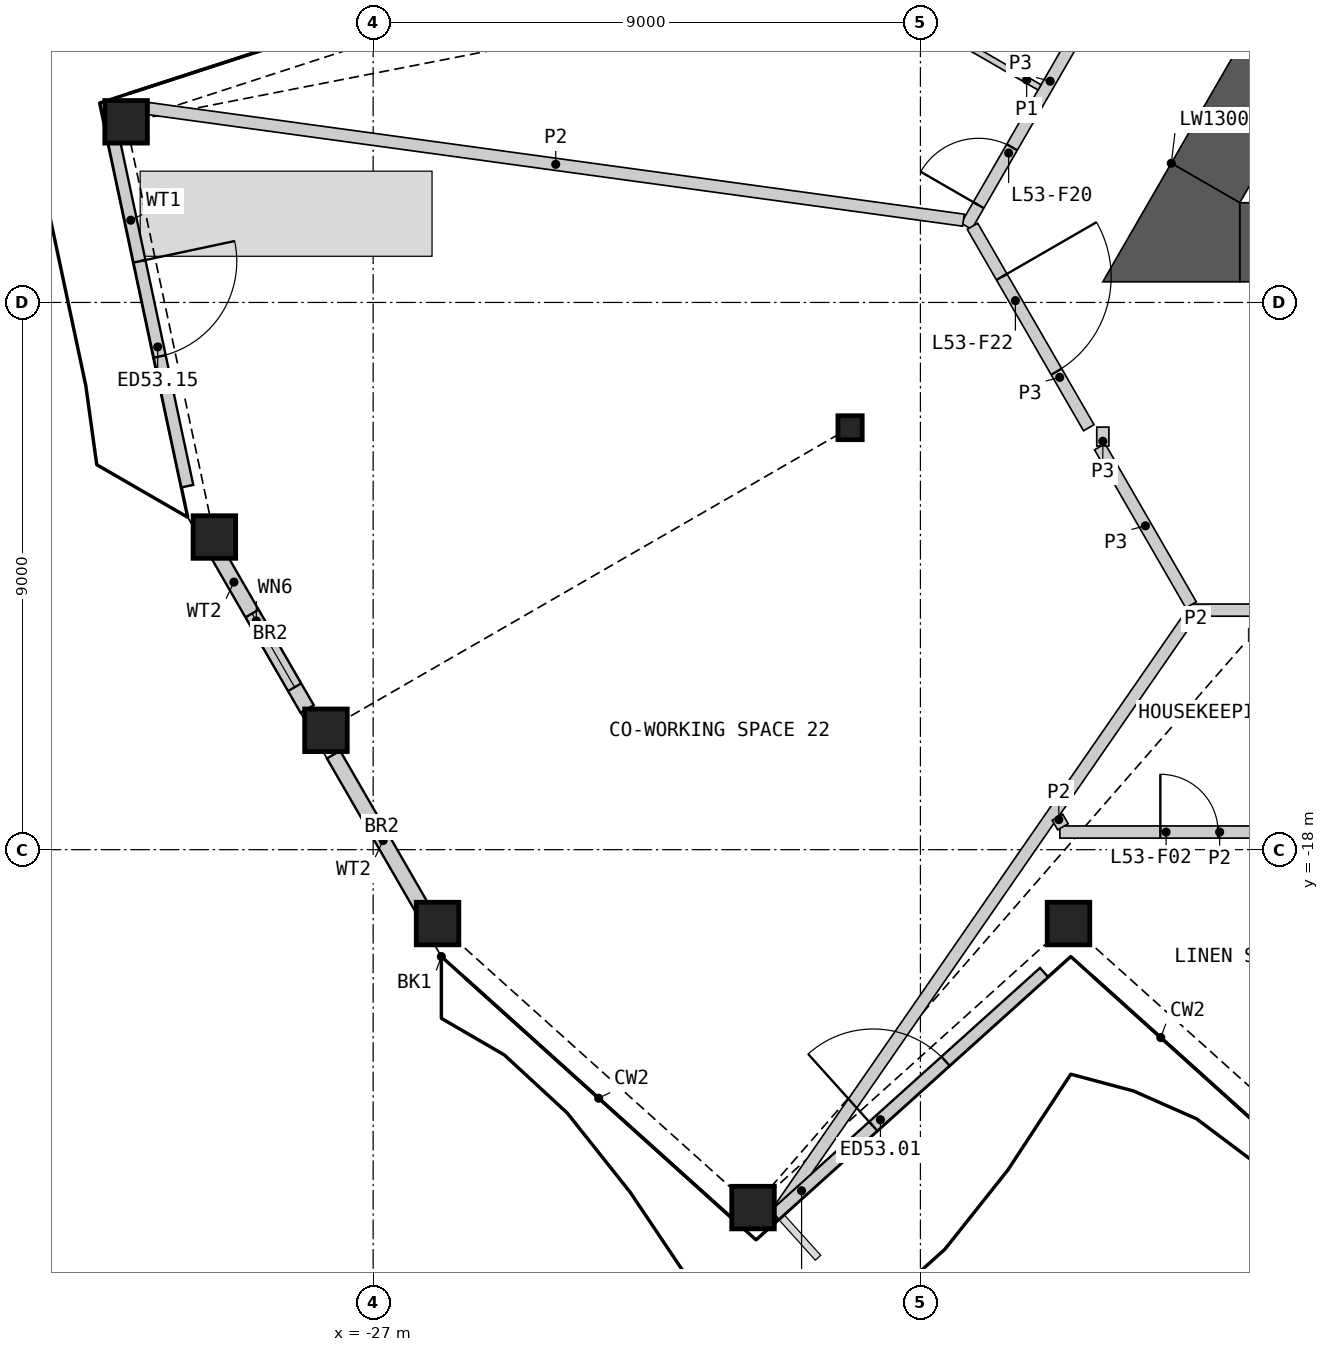
"""IFC4 building model, lengths in metres.
Left out: names, types, materials, properties, quantities, classifications, styles, units other than length and angle.
Written with IfcOpenShell. Run it as: python <this file> out.ifc"""

import sys

from ifc_helpers import new_model, si_unit, direction, frame, frame_2d, origin, origin_2d, place, context, subcontext, project, spatial, polyline, rectangle, hollow_rectangle, i_section, outline, extrude, element, fill, save


model = new_model("IFC4")
c1 = context("Model", 3, precision=1e-05, world=origin(), true_north=direction((0.0, 1.0)))
c2 = subcontext(c1, "Body", "Model", "MODEL_VIEW")
j1 = project(units=[si_unit("LENGTHUNIT", "METRE"), si_unit("PLANEANGLEUNIT", "RADIAN")], contexts=[c1])
p1 = place(None, origin())
s1 = spatial("IfcSite", under=j1, at=p1, CompositionType="ELEMENT")
p2 = place(p1, origin())
s2 = spatial("IfcBuilding", under=s1, at=p2, CompositionType="ELEMENT")
p3 = place(p2, frame((0.0, 0.0, 241.8)))
s3 = spatial("IfcBuildingStorey", under=s2, at=p3, CompositionType="ELEMENT", Elevation=241.8)
for number, where, z_axis, x_axis in (
    (1, (-25.941, -19.215, 0.0), (0.0, 0.0, 1.0), (1.0, 0.0, 0.0)),
    (2, (-20.753, -23.887, 0.0), (0.0, 0.0, 1.0), (1.0, 0.0, 0.0)),
    (3, (-15.565, -19.215, 0.0), (0.0, 0.0, 1.0), (1.0, 0.0, 0.0)),
    (4, (-31.063, -6.029, 0.0), (0.0, 0.0, 1.0), (1.0, 0.0, 0.0)),
    (5, (-29.612, -12.858, 0.0), (0.0, 0.0, 1.0), (1.0, 0.0, 0.0)),
    (6, (-27.776, -16.037, 0.0), (0.0, 0.0, 1.0), (1.0, 0.0, 0.0)),
):
    element("IfcColumn", number, at=place(p3, frame(where, z_axis=z_axis, x_axis=x_axis)), inside=s3, PredefinedType="COLUMN", context=c2, shape_type="SweptSolid", body=[
        extrude(hollow_rectangle(XDim=0.7, YDim=0.7, WallThickness=0.045, at=origin_2d()), origin(), (0.0, 0.0, 1.0), 3.6),
    ])
p4 = place(p3, frame((-19.157, -11.06, 0.0), z_axis=(0.0, 0.0, 1.0), x_axis=(1.0, 0.0, 0.0)))
e7 = element("IfcColumn", 7, at=p4, inside=s3, PredefinedType="COLUMN", context=c2, shape_type="SweptSolid", body=[
    extrude(i_section(OverallWidth=0.399, OverallDepth=0.393, WebThickness=0.023, FlangeThickness=0.037, at=origin_2d()), origin(), (0.0, 0.0, 1.0), 3.6),
])
p5 = place(p3, frame((-20.397, -24.009, 0.0), z_axis=(0.0, 0.0, 1.0), x_axis=(0.74315161366, 0.669123067241, 0.0)))
e8 = element("IfcWall", 8, at=p5, inside=s3, PredefinedType="SOLIDWALL", context=c2, shape_type="SweptSolid", body=[
    extrude(rectangle(XDim=5.963, YDim=0.2, at=frame_2d((2.981, 0.0))), origin(), (0.0, 0.0, 1.0), 2.701),
])
p6 = place(p5, frame((2.181, 0.0, 0.0)))
e9 = element("IfcOpeningElement", 9, at=p6, cuts=e8, PredefinedType="OPENING", context=c2, shape_type="SweptSolid", body=[
    extrude(rectangle(XDim=1.6, YDim=2.4, at=frame_2d((0.8, 1.2))), frame((0.0, 0.11, 0.0), z_axis=(0.0, -1.0, 0.0), x_axis=(1.0, 0.0, 0.0)), (0.0, 0.0, 1.0), 0.22),
])
p7 = place(p3, frame((-31.296, -6.189, 0.0), z_axis=(0.0, 0.0, 1.0), x_axis=(0.207920947907, -0.978145633033, 0.0)))
e10 = element("IfcWall", 10, at=p7, inside=s3, PredefinedType="SOLIDWALL", context=c2, shape_type="SweptSolid", body=[
    extrude(rectangle(XDim=5.963, YDim=0.2, at=frame_2d((2.981, 0.0))), origin(), (0.0, 0.0, 1.0), 2.701),
])
p8 = place(p7, frame((2.181, 0.0, 0.0)))
e11 = element("IfcOpeningElement", 11, at=p8, cuts=e10, PredefinedType="OPENING", context=c2, shape_type="SweptSolid", body=[
    extrude(rectangle(XDim=1.6, YDim=2.4, at=frame_2d((0.8, 1.2))), frame((0.0, 0.11, 0.0), z_axis=(0.0, -1.0, 0.0), x_axis=(1.0, 0.0, 0.0)), (0.0, 0.0, 1.0), 0.22),
])
p9 = place(p3, frame((-29.692, -12.904, 0.0), z_axis=(0.0, 0.0, 1.0), x_axis=(0.499987708133, -0.866032500381, 0.0)))
e12 = element("IfcWall", 12, at=p9, inside=s3, PredefinedType="SOLIDWALL", context=c2, shape_type="SweptSolid", body=[
    extrude(rectangle(XDim=3.213, YDim=0.25, at=frame_2d((1.607, 0.0))), origin(), (0.0, 0.0, 1.0), 2.701),
])
p10 = place(p9, frame((1.4, 0.0, 1.9)))
e13 = element("IfcOpeningElement", 13, at=p10, cuts=e12, PredefinedType="OPENING", context=c2, shape_type="SweptSolid", body=[
    extrude(rectangle(XDim=1.4, YDim=0.6, at=frame_2d((0.7, 0.3))), frame((0.0, 0.135, 0.0), z_axis=(0.0, -1.0, 0.0), x_axis=(1.0, 0.0, 0.0)), (0.0, 0.0, 1.0), 0.27),
])
p11 = place(p3, frame((-27.652, -16.437, 0.0), z_axis=(0.0, 0.0, 1.0), x_axis=(0.500026945261, -0.866009846372, 0.0)))
e14 = element("IfcWall", 14, at=p11, inside=s3, PredefinedType="SOLIDWALL", context=c2, shape_type="SweptSolid", body=[
    extrude(rectangle(XDim=3.262, YDim=0.25, at=frame_2d((1.631, 0.0))), origin(), (0.0, 0.0, 1.0), 2.701),
])
p12 = place(p3, frame((-12.748, -8.01, 0.0), z_axis=(0.0, 0.0, 1.0), x_axis=(1.0, 0.0, 0.0)))
e15 = element("IfcWall", 15, at=p12, inside=s3, PredefinedType="SHEAR", context=c2, shape_type="SweptSolid", body=[
    extrude(rectangle(XDim=4.26, YDim=1.3, at=frame_2d((2.13, 0.0))), origin(), (0.0, 0.0, 1.0), 3.25),
])
p13 = place(p3, frame((-10.338, -1.885, 0.0), z_axis=(0.0, 0.0, 1.0), x_axis=(-0.499975944838, -0.866039291593, 0.0)))
e16 = element("IfcWall", 16, at=p13, inside=s3, PredefinedType="SHEAR", context=c2, shape_type="SweptSolid", body=[
    extrude(rectangle(XDim=5.947, YDim=1.3, at=frame_2d((2.974, 0.0))), origin(), (0.0, 0.0, 1.0), 3.25),
])
p14 = place(p3, origin())
e17 = element("IfcWall", 17, at=p14, inside=s3, PredefinedType="SHEAR", context=c2, shape_type="SweptSolid", body=[
    extrude(outline(polyline([(-13.874, -6.71), (-12.748, -7.36), (-12.748, -8.66), (-15.0, -8.66), (-13.874, -6.71)])), origin(), (0.0, 0.0, 1.0), 3.25),
])
p15 = place(p3, frame((-13.599, -14.06, 0.0), z_axis=(0.0, 0.0, 1.0), x_axis=(1.0, 0.0, 0.0)))
e18 = element("IfcWall", 18, at=p15, inside=s3, PredefinedType="PARTITIONING", context=c2, shape_type="SweptSolid", body=[
    extrude(rectangle(XDim=27.198, YDim=0.2, at=frame_2d((13.599, 0.0))), origin(), (0.0, 0.0, 1.0), 3.25),
])
p16 = place(p15, frame((1.152, 0.0, 0.0)))
e19 = element("IfcOpeningElement", 19, at=p16, cuts=e18, PredefinedType="OPENING", context=c2, shape_type="SweptSolid", body=[
    extrude(rectangle(XDim=0.95, YDim=2.1, at=frame_2d((0.475, 1.05))), frame((0.0, 0.11, 0.0), z_axis=(0.0, -1.0, 0.0), x_axis=(1.0, 0.0, 0.0)), (0.0, 0.0, 1.0), 0.22),
])
p17 = place(p15, frame((16.311, 0.0, 0.0)))
e20 = element("IfcOpeningElement", 20, at=p17, cuts=e18, PredefinedType="OPENING", context=c2, shape_type="SweptSolid", body=[
    extrude(rectangle(XDim=1.1, YDim=2.1, at=frame_2d((0.55, 1.05))), frame((0.0, 0.11, 0.0), z_axis=(0.0, -1.0, 0.0), x_axis=(1.0, 0.0, 0.0)), (0.0, 0.0, 1.0), 0.22),
])
p18 = place(p15, frame((25.747, 0.0, 0.0)))
e21 = element("IfcOpeningElement", 21, at=p18, cuts=e18, PredefinedType="OPENING", context=c2, shape_type="SweptSolid", body=[
    extrude(rectangle(XDim=1.1, YDim=2.1, at=frame_2d((0.55, 1.05))), frame((0.0, 0.11, 0.0), z_axis=(0.0, -1.0, 0.0), x_axis=(1.0, 0.0, 0.0)), (0.0, 0.0, 1.0), 0.22),
])
p19 = place(p3, frame((-17.244, -7.747, 0.0), z_axis=(0.0, 0.0, 1.0), x_axis=(0.500017753321, 0.866015153657, 0.0)))
e22 = element("IfcWall", 22, at=p19, inside=s3, PredefinedType="PARTITIONING", context=c2, shape_type="SweptSolid", body=[
    extrude(rectangle(XDim=5.51, YDim=0.2, at=frame_2d((2.755, 0.0))), origin(), (0.0, 0.0, 1.0), 3.25),
])
p20 = place(p19, frame((0.401, 0.0, 0.0)))
e23 = element("IfcOpeningElement", 23, at=p20, cuts=e22, PredefinedType="OPENING", context=c2, shape_type="SweptSolid", body=[
    extrude(rectangle(XDim=1.1, YDim=2.1, at=frame_2d((0.55, 1.05))), frame((0.0, 0.11, 0.0), z_axis=(0.0, -1.0, 0.0), x_axis=(1.0, 0.0, 0.0)), (0.0, 0.0, 1.0), 0.22),
])
p21 = place(p3, frame((-17.144, -7.747, 0.0), z_axis=(0.0, 0.0, 1.0), x_axis=(0.499961815444, -0.866047448526, 0.0)))
e24 = element("IfcWall", 24, at=p21, inside=s3, PredefinedType="PARTITIONING", context=c2, shape_type="SweptSolid", body=[
    extrude(rectangle(XDim=3.826, YDim=0.2, at=frame_2d((1.913, 0.0))), origin(), (0.0, 0.0, 1.0), 3.25),
])
p22 = place(p21, frame((0.962, 0.0, 0.0)))
e25 = element("IfcOpeningElement", 25, at=p22, cuts=e24, PredefinedType="OPENING", context=c2, shape_type="SweptSolid", body=[
    extrude(rectangle(XDim=1.8, YDim=2.1, at=frame_2d((0.9, 1.05))), frame((0.0, 0.11, 0.0), z_axis=(0.0, -1.0, 0.0), x_axis=(1.0, 0.0, 0.0)), (0.0, 0.0, 1.0), 0.22),
])
p23 = place(p3, frame((-15.05, -11.374, 0.0), z_axis=(0.0, 0.0, 1.0), x_axis=(0.500048608389, -0.865997337899, 0.0)))
e26 = element("IfcWall", 26, at=p23, inside=s3, PredefinedType="PARTITIONING", context=c2, shape_type="SweptSolid", body=[
    extrude(rectangle(XDim=3.002, YDim=0.2, at=frame_2d((1.501, 0.0))), origin(), (0.0, 0.0, 1.0), 3.25),
])
p24 = place(p3, frame((-15.0, -11.36, 0.0), z_axis=(0.0, 0.0, 1.0), x_axis=(0.0, 1.0, 0.0)))
e27 = element("IfcWall", 27, at=p24, inside=s3, PredefinedType="PARTITIONING", context=c2, shape_type="SweptSolid", body=[
    extrude(rectangle(XDim=0.31, YDim=0.2, at=frame_2d((0.155, 0.0))), origin(), (0.0, 0.0, 1.0), 3.25),
])
p25 = place(p3, frame((-30.703, -5.81, 0.0), z_axis=(0.0, 0.0, 1.0), x_axis=(0.99075075074, -0.135694325259, 0.0)))
e28 = element("IfcWall", 28, at=p25, inside=s3, PredefinedType="PARTITIONING", context=c2, shape_type="SweptSolid", body=[
    extrude(rectangle(XDim=13.535, YDim=0.2, at=frame_2d((6.768, 0.0))), origin(), (0.0, 0.0, 1.0), 2.404),
])
p26 = place(p3, origin())
e29 = element("IfcWall", 29, at=p26, inside=s3, PredefinedType="PARTITIONING", context=c2, shape_type="SweptSolid", body=[
    extrude(outline(polyline([(-13.473, -14.199), (-19.794, -23.331), (-20.439, -23.912), (-13.638, -14.086), (-13.473, -14.199)])), origin(), (0.0, 0.0, 1.0), 2.404),
])
p27 = place(p3, frame((-15.706, -17.71, 0.0), z_axis=(0.0, 0.0, 1.0), x_axis=(1.0, 0.0, 0.0)))
e30 = element("IfcWall", 30, at=p27, inside=s3, PredefinedType="PARTITIONING", context=c2, shape_type="SweptSolid", body=[
    extrude(rectangle(XDim=5.255, YDim=0.2, at=frame_2d((2.627, 0.0))), origin(), (0.0, 0.0, 1.0), 2.404),
])
p28 = place(p27, frame((1.652, 0.0, 0.0)))
e31 = element("IfcOpeningElement", 31, at=p28, cuts=e30, PredefinedType="OPENING", context=c2, shape_type="SweptSolid", body=[
    extrude(rectangle(XDim=0.95, YDim=2.1, at=frame_2d((0.475, 1.05))), frame((0.0, 0.11, 0.0), z_axis=(0.0, -1.0, 0.0), x_axis=(1.0, 0.0, 0.0)), (0.0, 0.0, 1.0), 0.22),
])
p29 = place(p3, frame((-15.747, -17.467, 0.0), z_axis=(0.0, 0.0, 1.0), x_axis=(0.498749683645, -0.866746071848, 0.0)))
e32 = element("IfcWall", 32, at=p29, inside=s3, PredefinedType="PARTITIONING", context=c2, shape_type="SweptSolid", body=[
    extrude(rectangle(XDim=0.181, YDim=0.2, at=frame_2d((0.091, 0.0))), origin(), (0.0, 0.0, 1.0), 2.404),
])
p30 = place(p3, frame((-18.163, -4.238, 0.0), z_axis=(0.0, 0.0, 1.0), x_axis=(0.866014668023, -0.500018594424, 0.0)))
e33 = element("IfcWall", 33, at=p30, inside=s3, PredefinedType="PARTITIONING", context=c2, shape_type="SweptSolid", body=[
    extrude(rectangle(XDim=2.45, YDim=0.1, at=frame_2d((1.225, 0.0))), origin(), (0.0, 0.0, 1.0), 2.404),
])
p31 = place(p6, origin())
e34 = element("IfcDoor", 34, at=p31, inside=s3, OperationType="DOUBLE_DOOR_SINGLE_SWING", PredefinedType="DOOR", context=c2, shape_type="SweptSolid", body=[
    extrude(rectangle(XDim=1.6, YDim=2.4, at=frame_2d((0.8, 1.2))), frame((0.0, 0.025, 0.0), z_axis=(0.0, -1.0, 0.0), x_axis=(1.0, 0.0, 0.0)), (0.0, 0.0, 1.0), 0.05),
])
fill(e9, e34)
p32 = place(p8, origin())
e35 = element("IfcDoor", 35, at=p32, inside=s3, OperationType="DOUBLE_DOOR_SINGLE_SWING", PredefinedType="DOOR", context=c2, shape_type="SweptSolid", body=[
    extrude(rectangle(XDim=1.6, YDim=2.4, at=frame_2d((0.8, 1.2))), frame((0.0, 0.025, 0.0), z_axis=(0.0, -1.0, 0.0), x_axis=(1.0, 0.0, 0.0)), (0.0, 0.0, 1.0), 0.05),
])
fill(e11, e35)
p33 = place(p10, origin())
e36 = element("IfcWindow", 36, at=p33, inside=s3, PartitioningType="SINGLE_PANEL", PredefinedType="WINDOW", context=c2, shape_type="SweptSolid", body=[
    extrude(rectangle(XDim=1.4, YDim=0.6, at=frame_2d((0.7, 0.3))), frame((0.0, 0.03, 0.0), z_axis=(0.0, -1.0, 0.0), x_axis=(1.0, 0.0, 0.0)), (0.0, 0.0, 1.0), 0.06),
])
fill(e13, e36)
p34 = place(p28, origin())
e37 = element("IfcDoor", 37, at=p34, inside=s3, OperationType="SINGLE_SWING_LEFT", PredefinedType="DOOR", context=c2, shape_type="SweptSolid", body=[
    extrude(rectangle(XDim=0.95, YDim=2.1, at=frame_2d((0.475, 1.05))), frame((0.0, 0.025, 0.0), z_axis=(0.0, -1.0, 0.0), x_axis=(1.0, 0.0, 0.0)), (0.0, 0.0, 1.0), 0.05),
])
fill(e31, e37)
p35 = place(p20, origin())
e38 = element("IfcDoor", 38, at=p35, inside=s3, OperationType="SINGLE_SWING_LEFT", PredefinedType="DOOR", context=c2, shape_type="SweptSolid", body=[
    extrude(rectangle(XDim=1.1, YDim=2.1, at=frame_2d((0.55, 1.05))), frame((0.0, 0.025, 0.0), z_axis=(0.0, -1.0, 0.0), x_axis=(1.0, 0.0, 0.0)), (0.0, 0.0, 1.0), 0.05),
])
fill(e23, e38)
p36 = place(p22, origin())
e39 = element("IfcDoor", 39, at=p36, inside=s3, OperationType="DOUBLE_DOOR_SINGLE_SWING", PredefinedType="DOOR", context=c2, shape_type="SweptSolid", body=[
    extrude(rectangle(XDim=1.8, YDim=2.1, at=frame_2d((0.9, 1.05))), frame((0.0, 0.025, 0.0), z_axis=(0.0, -1.0, 0.0), x_axis=(1.0, 0.0, 0.0)), (0.0, 0.0, 1.0), 0.05),
])
fill(e25, e39)
save(model, sys.argv[1])
